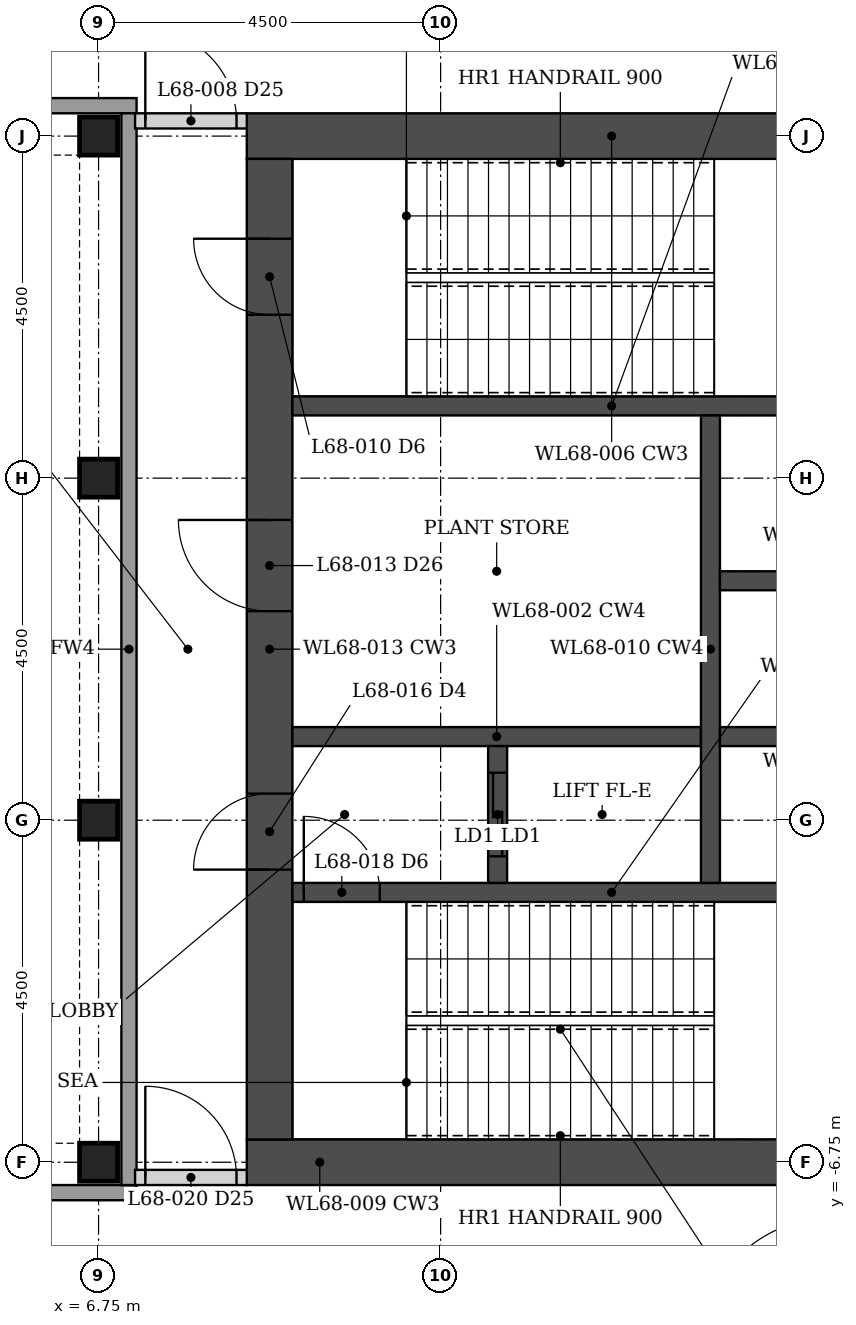
"""IFC4 building model, lengths in metres.
Left out: names, types, materials, properties, quantities, classifications, styles, units other than length and angle.
Written with IfcOpenShell. Run it as: python <this file> out.ifc"""

import sys

from ifc_helpers import new_model, si_unit, direction, frame, frame_2d, origin, origin_2d, place, context, subcontext, project, spatial, rectangle, hollow_rectangle, extrude, element, fill, save


model = new_model("IFC4")
c1 = context("Model", 3, precision=1e-05, world=origin(), true_north=direction((0.0, 1.0)))
c2 = subcontext(c1, "Body", "Model", "MODEL_VIEW")
j1 = project(units=[si_unit("LENGTHUNIT", "METRE"), si_unit("PLANEANGLEUNIT", "RADIAN")], contexts=[c1])
p1 = place(None, origin())
s1 = spatial("IfcSite", under=j1, at=p1, CompositionType="ELEMENT")
p2 = place(p1, origin())
s2 = spatial("IfcBuilding", under=s1, at=p2, CompositionType="ELEMENT")
p3 = place(p2, frame((0.0, 0.0, 262.05)))
s3 = spatial("IfcBuildingStorey", under=s2, at=p3, CompositionType="ELEMENT", Elevation=262.05)
for number, where, z_axis, x_axis in (
    (1, (6.75, -6.75, 0.0), (0.0, 0.0, 1.0), (1.0, 0.0, 0.0)),
    (2, (6.75, -2.25, 0.0), (0.0, 0.0, 1.0), (1.0, 0.0, 0.0)),
    (3, (6.75, 2.25, 0.0), (0.0, 0.0, 1.0), (1.0, 0.0, 0.0)),
    (4, (6.75, 6.75, 0.0), (0.0, 0.0, 1.0), (1.0, 0.0, 0.0)),
):
    element("IfcColumn", number, at=place(p3, frame(where, z_axis=z_axis, x_axis=x_axis)), inside=s3, PredefinedType="COLUMN", context=c2, shape_type="SweptSolid", body=[
        extrude(hollow_rectangle(XDim=0.5, YDim=0.5, WallThickness=0.025, at=origin_2d()), origin(), (0.0, 0.0, 1.0), 6.0),
    ])
for number, where, z_axis, x_axis in (
    (5, (8.7, -6.75, 0.0), (0.0, 0.0, 1.0), (1.0, 0.0, 0.0)),
    (6, (8.7, 6.75, 0.0), (0.0, 0.0, 1.0), (1.0, 0.0, 0.0)),
):
    element("IfcWall", number, at=place(p3, frame(where, z_axis=z_axis, x_axis=x_axis)), inside=s3, PredefinedType="SHEAR", context=c2, shape_type="SweptSolid", body=[
        extrude(rectangle(XDim=9.6, YDim=0.6, at=frame_2d((4.8, 0.0))), origin(), (0.0, 0.0, 1.0), 6.0),
    ])
p4 = place(p3, frame((9.0, -6.45, 0.0), z_axis=(0.0, 0.0, 1.0), x_axis=(0.0, 1.0, 0.0)))
e7 = element("IfcWall", 7, at=p4, inside=s3, PredefinedType="SHEAR", context=c2, shape_type="SweptSolid", body=[
    extrude(rectangle(XDim=12.9, YDim=0.6, at=frame_2d((6.45, 0.0))), origin(), (0.0, 0.0, 1.0), 6.0),
])
p5 = place(p4, frame((3.55, 0.0, 0.0)))
e8 = element("IfcOpeningElement", 8, at=p5, cuts=e7, PredefinedType="OPENING", context=c2, shape_type="SweptSolid", body=[
    extrude(rectangle(XDim=1.0, YDim=2.1, at=frame_2d((0.5, 1.05))), frame((0.0, 0.31, 0.0), z_axis=(0.0, -1.0, 0.0), x_axis=(1.0, 0.0, 0.0)), (0.0, 0.0, 1.0), 0.62),
])
p6 = place(p4, frame((6.95, 0.0, 0.0)))
e9 = element("IfcOpeningElement", 9, at=p6, cuts=e7, PredefinedType="OPENING", context=c2, shape_type="SweptSolid", body=[
    extrude(rectangle(XDim=1.2, YDim=2.1, at=frame_2d((0.6, 1.05))), frame((0.0, 0.31, 0.0), z_axis=(0.0, -1.0, 0.0), x_axis=(1.0, 0.0, 0.0)), (0.0, 0.0, 1.0), 0.62),
])
p7 = place(p4, frame((10.85, 0.0, 0.0)))
e10 = element("IfcOpeningElement", 10, at=p7, cuts=e7, PredefinedType="OPENING", context=c2, shape_type="SweptSolid", body=[
    extrude(rectangle(XDim=1.0, YDim=2.1, at=frame_2d((0.5, 1.05))), frame((0.0, 0.31, 0.0), z_axis=(0.0, -1.0, 0.0), x_axis=(1.0, 0.0, 0.0)), (0.0, 0.0, 1.0), 0.62),
])
p8 = place(p3, frame((9.3, -3.2, 0.0), z_axis=(0.0, 0.0, 1.0), x_axis=(1.0, 0.0, 0.0)))
e11 = element("IfcWall", 11, at=p8, inside=s3, PredefinedType="SHEAR", context=c2, shape_type="SweptSolid", body=[
    extrude(rectangle(XDim=8.4, YDim=0.25, at=frame_2d((4.2, 0.0))), origin(), (0.0, 0.0, 1.0), 6.0),
])
p9 = place(p8, frame((0.15, 0.0, 0.0)))
e12 = element("IfcOpeningElement", 12, at=p9, cuts=e11, PredefinedType="OPENING", context=c2, shape_type="SweptSolid", body=[
    extrude(rectangle(XDim=1.0, YDim=2.1, at=frame_2d((0.5, 1.05))), frame((0.0, 0.135, 0.0), z_axis=(0.0, -1.0, 0.0), x_axis=(1.0, 0.0, 0.0)), (0.0, 0.0, 1.0), 0.27),
])
p10 = place(p3, frame((9.3, 3.2, 0.0), z_axis=(0.0, 0.0, 1.0), x_axis=(1.0, 0.0, 0.0)))
e13 = element("IfcWall", 13, at=p10, inside=s3, PredefinedType="SHEAR", context=c2, shape_type="SweptSolid", body=[
    extrude(rectangle(XDim=8.4, YDim=0.25, at=frame_2d((4.2, 0.0))), origin(), (0.0, 0.0, 1.0), 6.0),
])
p11 = place(p3, frame((9.3, -1.15, 0.0), z_axis=(0.0, 0.0, 1.0), x_axis=(1.0, 0.0, 0.0)))
e14 = element("IfcWall", 14, at=p11, inside=s3, PredefinedType="SHEAR", context=c2, shape_type="SweptSolid", body=[
    extrude(rectangle(XDim=5.375, YDim=0.25, at=frame_2d((2.688, 0.0))), origin(), (0.0, 0.0, 1.0), 6.0),
])
p12 = place(p3, frame((12.0, -3.075, 0.0), z_axis=(0.0, 0.0, 1.0), x_axis=(0.0, 1.0, 0.0)))
e15 = element("IfcWall", 15, at=p12, inside=s3, PredefinedType="SHEAR", context=c2, shape_type="SweptSolid", body=[
    extrude(rectangle(XDim=1.8, YDim=0.25, at=frame_2d((0.9, 0.0))), origin(), (0.0, 0.0, 1.0), 6.0),
])
p13 = place(p12, frame((0.35, 0.0, 0.0)))
e16 = element("IfcOpeningElement", 16, at=p13, cuts=e15, PredefinedType="OPENING", context=c2, shape_type="SweptSolid", body=[
    extrude(rectangle(XDim=1.1, YDim=2.1, at=frame_2d((0.55, 1.05))), frame((0.0, 0.135, 0.0), z_axis=(0.0, -1.0, 0.0), x_axis=(1.0, 0.0, 0.0)), (0.0, 0.0, 1.0), 0.27),
])
p14 = place(p3, frame((14.8, -3.075, 0.0), z_axis=(0.0, 0.0, 1.0), x_axis=(0.0, 1.0, 0.0)))
e17 = element("IfcWall", 17, at=p14, inside=s3, PredefinedType="SHEAR", context=c2, shape_type="SweptSolid", body=[
    extrude(rectangle(XDim=6.15, YDim=0.25, at=frame_2d((3.075, 0.0))), origin(), (0.0, 0.0, 1.0), 6.0),
])
for number, where, z_axis, x_axis in (
    (18, (14.925, -1.15, 0.0), (0.0, 0.0, 1.0), (1.0, 0.0, 0.0)),
    (19, (14.925, 0.9, 0.0), (0.0, 0.0, 1.0), (1.0, 0.0, 0.0)),
):
    element("IfcWall", number, at=place(p3, frame(where, z_axis=z_axis, x_axis=x_axis)), inside=s3, PredefinedType="SHEAR", context=c2, shape_type="SweptSolid", body=[
        extrude(rectangle(XDim=2.775, YDim=0.25, at=frame_2d((1.387, 0.0))), origin(), (0.0, 0.0, 1.0), 6.0),
    ])
for number, where, z_axis, x_axis in (
    (20, (-7.25, 7.15, 0.0), (0.0, 0.0, 1.0), (1.0, 0.0, 0.0)),
    (21, (-7.25, -7.15, 0.0), (0.0, 0.0, 1.0), (1.0, 0.0, 0.0)),
):
    element("IfcWall", number, at=place(p3, frame(where, z_axis=z_axis, x_axis=x_axis)), inside=s3, PredefinedType="SOLIDWALL", context=c2, shape_type="SweptSolid", body=[
        extrude(rectangle(XDim=14.5, YDim=0.2, at=frame_2d((7.25, 0.0))), origin(), (0.0, 0.0, 1.0), 4.823),
    ])
p15 = place(p3, frame((7.15, -7.05, 0.0), z_axis=(0.0, 0.0, 1.0), x_axis=(0.0, 1.0, 0.0)))
e22 = element("IfcWall", 22, at=p15, inside=s3, PredefinedType="SOLIDWALL", context=c2, shape_type="SweptSolid", body=[
    extrude(rectangle(XDim=14.1, YDim=0.2, at=frame_2d((7.05, 0.0))), origin(), (0.0, 0.0, 1.0), 4.823),
])
p16 = place(p3, frame((7.23, 6.95, 0.0), z_axis=(0.0, 0.0, 1.0), x_axis=(1.0, 0.0, 0.0)))
e23 = element("IfcWall", 23, at=p16, inside=s3, PredefinedType="PARTITIONING", context=c2, shape_type="SweptSolid", body=[
    extrude(rectangle(XDim=1.47, YDim=0.2, at=frame_2d((0.735, 0.0))), origin(), (0.0, 0.0, 1.0), 4.823),
])
p17 = place(p16, frame((0.135, 0.0, 0.0)))
e24 = element("IfcOpeningElement", 24, at=p17, cuts=e23, PredefinedType="OPENING", context=c2, shape_type="SweptSolid", body=[
    extrude(rectangle(XDim=1.2, YDim=2.1, at=frame_2d((0.6, 1.05))), frame((0.0, 0.11, 0.0), z_axis=(0.0, -1.0, 0.0), x_axis=(1.0, 0.0, 0.0)), (0.0, 0.0, 1.0), 0.22),
])
p18 = place(p3, frame((7.23, -6.95, 0.0), z_axis=(0.0, 0.0, 1.0), x_axis=(1.0, 0.0, 0.0)))
e25 = element("IfcWall", 25, at=p18, inside=s3, PredefinedType="PARTITIONING", context=c2, shape_type="SweptSolid", body=[
    extrude(rectangle(XDim=1.47, YDim=0.2, at=frame_2d((0.735, 0.0))), origin(), (0.0, 0.0, 1.0), 4.823),
])
p19 = place(p18, frame((0.135, 0.0, 0.0)))
e26 = element("IfcOpeningElement", 26, at=p19, cuts=e25, PredefinedType="OPENING", context=c2, shape_type="SweptSolid", body=[
    extrude(rectangle(XDim=1.2, YDim=2.1, at=frame_2d((0.6, 1.05))), frame((0.0, 0.11, 0.0), z_axis=(0.0, -1.0, 0.0), x_axis=(1.0, 0.0, 0.0)), (0.0, 0.0, 1.0), 0.22),
])
p20 = place(p17, origin())
e27 = element("IfcDoor", 27, at=p20, inside=s3, OperationType="DOUBLE_DOOR_DOUBLE_SWING", PredefinedType="DOOR", context=c2, shape_type="SweptSolid", body=[
    extrude(rectangle(XDim=1.2, YDim=2.1, at=frame_2d((0.6, 1.05))), frame((0.0, 0.025, 0.0), z_axis=(0.0, -1.0, 0.0), x_axis=(1.0, 0.0, 0.0)), (0.0, 0.0, 1.0), 0.05),
])
fill(e24, e27)
p21 = place(p19, origin())
e28 = element("IfcDoor", 28, at=p21, inside=s3, OperationType="DOUBLE_DOOR_DOUBLE_SWING", PredefinedType="DOOR", context=c2, shape_type="SweptSolid", body=[
    extrude(rectangle(XDim=1.2, YDim=2.1, at=frame_2d((0.6, 1.05))), frame((0.0, 0.025, 0.0), z_axis=(0.0, -1.0, 0.0), x_axis=(1.0, 0.0, 0.0)), (0.0, 0.0, 1.0), 0.05),
])
fill(e26, e28)
p22 = place(p5, origin())
e29 = element("IfcDoor", 29, at=p22, inside=s3, OperationType="SINGLE_SWING_LEFT", PredefinedType="DOOR", context=c2, shape_type="SweptSolid", body=[
    extrude(rectangle(XDim=1.0, YDim=2.1, at=frame_2d((0.5, 1.05))), frame((0.0, 0.025, 0.0), z_axis=(0.0, -1.0, 0.0), x_axis=(1.0, 0.0, 0.0)), (0.0, 0.0, 1.0), 0.05),
])
fill(e8, e29)
p23 = place(p9, origin())
e30 = element("IfcDoor", 30, at=p23, inside=s3, OperationType="SINGLE_SWING_LEFT", PredefinedType="DOOR", context=c2, shape_type="SweptSolid", body=[
    extrude(rectangle(XDim=1.0, YDim=2.1, at=frame_2d((0.5, 1.05))), frame((0.0, 0.025, 0.0), z_axis=(0.0, -1.0, 0.0), x_axis=(1.0, 0.0, 0.0)), (0.0, 0.0, 1.0), 0.05),
])
fill(e12, e30)
p24 = place(p6, origin())
e31 = element("IfcDoor", 31, at=p24, inside=s3, OperationType="SINGLE_SWING_RIGHT", PredefinedType="DOOR", context=c2, shape_type="SweptSolid", body=[
    extrude(rectangle(XDim=1.2, YDim=2.1, at=frame_2d((0.6, 1.05))), frame((0.0, 0.025, 0.0), z_axis=(0.0, -1.0, 0.0), x_axis=(1.0, 0.0, 0.0)), (0.0, 0.0, 1.0), 0.05),
])
fill(e9, e31)
p25 = place(p7, origin())
e32 = element("IfcDoor", 32, at=p25, inside=s3, OperationType="SINGLE_SWING_RIGHT", PredefinedType="DOOR", context=c2, shape_type="SweptSolid", body=[
    extrude(rectangle(XDim=1.0, YDim=2.1, at=frame_2d((0.5, 1.05))), frame((0.0, 0.025, 0.0), z_axis=(0.0, -1.0, 0.0), x_axis=(1.0, 0.0, 0.0)), (0.0, 0.0, 1.0), 0.05),
])
fill(e10, e32)
p26 = place(p13, origin())
e33 = element("IfcDoor", 33, at=p26, inside=s3, OperationType="DOUBLE_DOOR_SLIDING", PredefinedType="DOOR", context=c2, shape_type="SweptSolid", body=[
    extrude(rectangle(XDim=1.1, YDim=2.1, at=frame_2d((0.55, 1.05))), frame((0.0, 0.025, 0.0), z_axis=(0.0, -1.0, 0.0), x_axis=(1.0, 0.0, 0.0)), (0.0, 0.0, 1.0), 0.05),
])
fill(e16, e33)
save(model, sys.argv[1])
